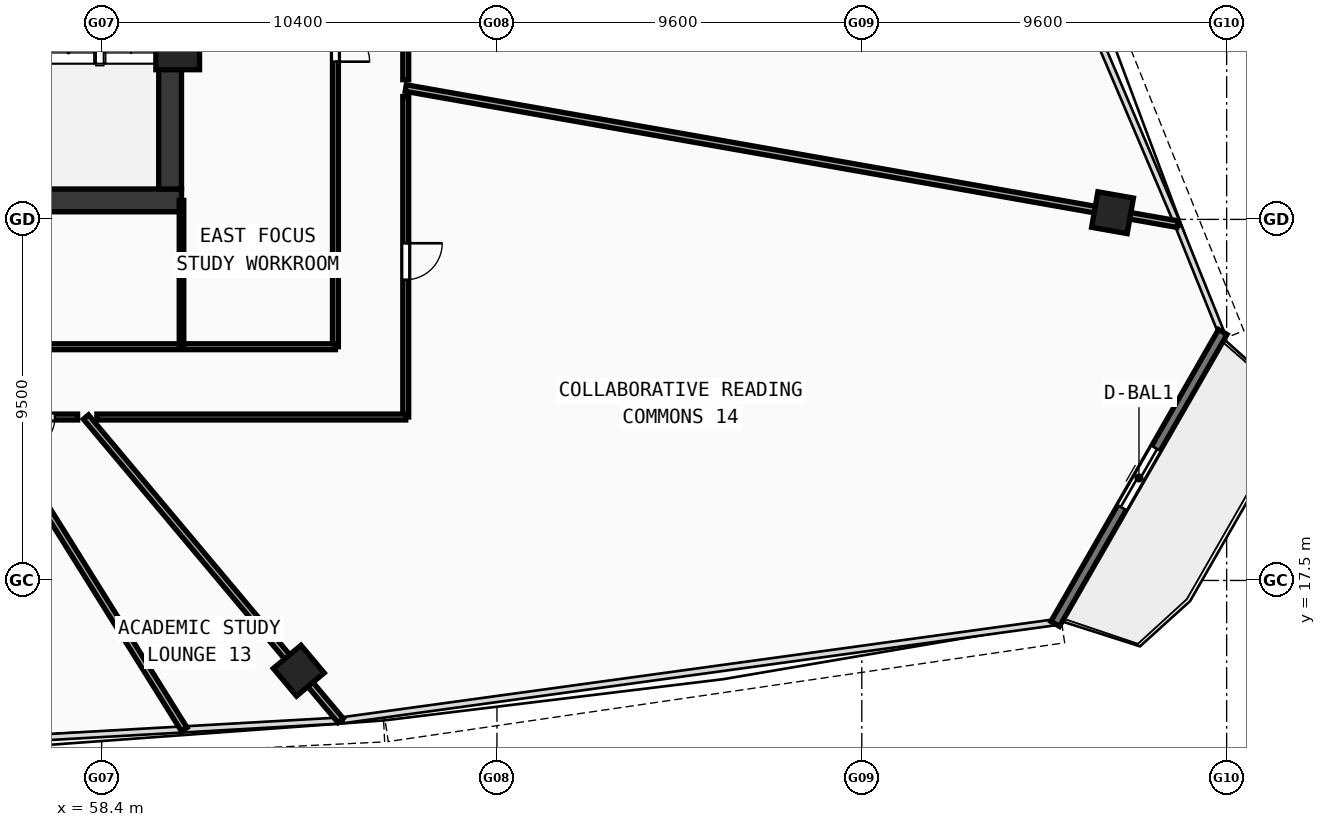
"""IFC4 building model, lengths in metres.
Left out: names, types, materials, properties, quantities, classifications, styles, units other than length and angle.
Written with IfcOpenShell. Run it as: python <this file> out.ifc"""

import sys

from ifc_helpers import new_model, si_unit, direction, frame, frame_2d, origin, origin_with_axes, origin_2d, place, context, subcontext, project, spatial, rectangle, hollow_rectangle, extrude, source, transform, mapped, element, fill, save


model = new_model("IFC4")
c1 = context("Model", 3, precision=1e-05, world=origin(), true_north=direction((0.0, 1.0)))
c2 = subcontext(c1, "Body", "Model", "MODEL_VIEW")
j1 = project(units=[si_unit("LENGTHUNIT", "METRE"), si_unit("PLANEANGLEUNIT", "RADIAN")], contexts=[c1])
p1 = place(None, origin())
s1 = spatial("IfcSite", under=j1, at=p1, CompositionType="ELEMENT")
p2 = place(p1, origin())
s2 = spatial("IfcBuilding", under=s1, at=p2, CompositionType="ELEMENT")
p3 = place(p2, frame((0.0, 0.0, 148.23)))
s3 = spatial("IfcBuildingStorey", under=s2, at=p3, CompositionType="ELEMENT", Elevation=148.23)
p4 = place(p3, frame((35.5, 27.5, 0.0), z_axis=(0.0, 0.0, 1.0), x_axis=(1.0, 0.0, 0.0)))
e1 = element("IfcWall", 1, at=p4, inside=s3, PredefinedType="SHEAR", context=c2, shape_type="SweptSolid", body=[
    extrude(rectangle(XDim=25.0, YDim=0.6, at=frame_2d((12.5, 0.0))), origin(), (0.0, 0.0, 1.0), 3.42),
])
p5 = place(p3, frame((60.2, 27.8, 0.0), z_axis=(0.0, 0.0, 1.0), x_axis=(0.0, 1.0, 0.0)))
e2 = element("IfcWall", 2, at=p5, inside=s3, PredefinedType="SHEAR", context=c2, shape_type="SweptSolid", body=[
    extrude(rectangle(XDim=12.1, YDim=0.6, at=frame_2d((6.05, 0.0))), origin(), (0.0, 0.0, 1.0), 3.42),
])
m1 = source(origin(), c2, "Body", "SweptSolid", [
    extrude(hollow_rectangle(XDim=1.15, YDim=1.15, WallThickness=0.048, at=origin_2d()), origin(), (0.0, 0.0, 1.0), 3.68),
])
p6 = place(p3, frame((60.4, 31.513, -0.26), z_axis=(0.0, 0.0, 1.0), x_axis=(1.0, 0.0, 0.0)))
e3 = element("IfcColumn", 3, at=p6, inside=s3, PredefinedType="COLUMN", context=c2, shape_type="MappedRepresentation", body=[
    mapped(m1, transform((0.0, 0.0, 0.0), scale=1.0)),
])
m2 = source(origin(), c2, "Body", "SweptSolid", [
    extrude(hollow_rectangle(XDim=0.95, YDim=0.95, WallThickness=0.04, at=origin_2d()), origin(), (0.0, 0.0, 1.0), 3.68),
])
for number, where, z_axis, x_axis in (
    (4, (63.585, 15.126, -0.26), (0.0, 0.0, 1.0), (0.766, 0.643, 0.0)),
    (5, (84.997, 27.177, -0.26), (0.0, 0.0, 1.0), (0.174, 0.985, 0.0)),
):
    element("IfcColumn", number, at=place(p3, frame(where, z_axis=z_axis, x_axis=x_axis)), inside=s3, PredefinedType="COLUMN", context=c2, shape_type="MappedRepresentation", body=[
        mapped(m2, transform((0.0, 0.0, 0.0), scale=1.0)),
    ])
p7 = place(p3, frame((83.488, 16.356, 0.0), z_axis=(0.0, 0.0, 1.0), x_axis=(0.497915888941, 0.867225326856, 0.0)))
e6 = element("IfcWall", 6, at=p7, inside=s3, PredefinedType="STANDARD", context=c2, shape_type="SweptSolid", body=[
    extrude(rectangle(XDim=8.858, YDim=0.26, at=frame_2d((4.429, 0.0))), origin(), (0.0, 0.0, 1.0), 3.42),
])
p8 = place(p7, frame((3.529, 0.0, 0.0)))
e7 = element("IfcOpeningElement", 7, at=p8, cuts=e6, PredefinedType="OPENING", context=c2, shape_type="SweptSolid", body=[
    extrude(rectangle(XDim=1.8, YDim=2.15, at=frame_2d((0.9, 1.075))), frame((0.0, 0.14, 0.0), z_axis=(0.0, -1.0, 0.0), x_axis=(1.0, 0.0, 0.0)), (0.0, 0.0, 1.0), 0.28),
])
p9 = place(p3, frame((64.55, 23.65, 0.0), z_axis=(0.0, 0.0, 1.0), x_axis=(0.0, 1.0, 0.0)))
e8 = element("IfcWall", 8, at=p9, inside=s3, PredefinedType="PARTITIONING", context=c2, shape_type="SweptSolid", body=[
    extrude(rectangle(XDim=16.6, YDim=0.155, at=frame_2d((8.3, 0.0))), origin(), (0.0, 0.0, 1.0), 2.77),
])
p10 = place(p9, frame((7.5, 0.0, 0.0)))
e9 = element("IfcOpeningElement", 9, at=p10, cuts=e8, PredefinedType="OPENING", context=c2, shape_type="SweptSolid", body=[
    extrude(rectangle(XDim=0.9, YDim=2.08, at=frame_2d((0.45, 1.04))), frame((0.0, 0.087, 0.0), z_axis=(0.0, -1.0, 0.0), x_axis=(1.0, 0.0, 0.0)), (0.0, 0.0, 1.0), 0.175),
])
p11 = place(p3, frame((31.45, 23.65, 0.0), z_axis=(0.0, 0.0, 1.0), x_axis=(1.0, 0.0, 0.0)))
e10 = element("IfcWall", 10, at=p11, inside=s3, PredefinedType="PARTITIONING", context=c2, shape_type="SweptSolid", body=[
    extrude(rectangle(XDim=33.1, YDim=0.155, at=frame_2d((16.55, 0.0))), origin(), (0.0, 0.0, 1.0), 2.77),
])
p12 = place(p11, frame((16.0, 0.0, 0.0)))
e11 = element("IfcOpeningElement", 11, at=p12, cuts=e10, PredefinedType="OPENING", context=c2, shape_type="SweptSolid", body=[
    extrude(rectangle(XDim=0.92, YDim=2.1, at=frame_2d((0.46, 1.05))), frame((0.0, 0.087, 0.0), z_axis=(0.0, -1.0, 0.0), x_axis=(1.0, 0.0, 0.0)), (0.0, 0.0, 1.0), 0.175),
])
p13 = place(p3, frame((60.5, 23.65, 0.0), z_axis=(0.0, 0.0, 1.0), x_axis=(0.0, 1.0, 0.0)))
e12 = element("IfcWall", 12, at=p13, inside=s3, PredefinedType="PARTITIONING", context=c2, shape_type="SweptSolid", body=[
    extrude(rectangle(XDim=3.85, YDim=0.12, at=frame_2d((1.925, 0.0))), origin(), (0.0, 0.0, 1.0), 3.02),
])
p14 = place(p3, frame((55.436, 21.8, 0.0), z_axis=(0.0, 0.0, 1.0), x_axis=(0.529931002604, -0.848040761096, 0.0)))
e13 = element("IfcWall", 13, at=p14, inside=s3, PredefinedType="PARTITIONING", context=c2, shape_type="SweptSolid", body=[
    extrude(rectangle(XDim=9.691, YDim=0.175, at=frame_2d((4.845, 0.0))), origin(), (0.0, 0.0, 1.0), 2.77),
])
p15 = place(p3, frame((57.985, 21.8, 0.0), z_axis=(0.0, 0.0, 1.0), x_axis=(0.642781677101, -0.76604942111, 0.0)))
e14 = element("IfcWall", 14, at=p15, inside=s3, PredefinedType="PARTITIONING", context=c2, shape_type="SweptSolid", body=[
    extrude(rectangle(XDim=10.424, YDim=0.175, at=frame_2d((5.212, 0.0))), origin(), (0.0, 0.0, 1.0), 2.77),
])
p16 = place(p3, frame((66.4, 30.456, 0.0), z_axis=(0.0, 0.0, 1.0), x_axis=(0.984807623882, -0.173648909998, 0.0)))
e15 = element("IfcWall", 15, at=p16, inside=s3, PredefinedType="PARTITIONING", context=c2, shape_type="SweptSolid", body=[
    extrude(rectangle(XDim=20.622, YDim=0.175, at=frame_2d((10.311, 0.0))), origin(), (0.0, 0.0, 1.0), 2.77),
])
p17 = place(p3, frame((66.4, 39.459, 0.0), z_axis=(0.0, 0.0, 1.0), x_axis=(0.0, -1.0, 0.0)))
e16 = element("IfcWall", 16, at=p17, inside=s3, PredefinedType="PARTITIONING", context=c2, shape_type="SweptSolid", body=[
    extrude(rectangle(XDim=8.783, YDim=0.155, at=frame_2d((4.392, 0.0))), origin(), (0.0, 0.0, 1.0), 3.42),
])
p18 = place(p17, frame((3.932, 0.0, 0.0)))
e17 = element("IfcOpeningElement", 17, at=p18, cuts=e16, PredefinedType="OPENING", context=c2, shape_type="SweptSolid", body=[
    extrude(rectangle(XDim=0.92, YDim=2.1, at=frame_2d((0.46, 1.05))), frame((0.0, 0.087, 0.0), z_axis=(0.0, -1.0, 0.0), x_axis=(1.0, 0.0, 0.0)), (0.0, 0.0, 1.0), 0.175),
])
p19 = place(p3, frame((66.4, 30.232, 0.0), z_axis=(0.0, 0.0, 1.0), x_axis=(0.0, -1.0, 0.0)))
e18 = element("IfcWall", 18, at=p19, inside=s3, PredefinedType="PARTITIONING", context=c2, shape_type="SweptSolid", body=[
    extrude(rectangle(XDim=8.432, YDim=0.155, at=frame_2d((4.216, 0.0))), origin(), (0.0, 0.0, 1.0), 3.02),
])
p20 = place(p19, frame((3.859, 0.0, 0.0)))
e19 = element("IfcOpeningElement", 19, at=p20, cuts=e18, PredefinedType="OPENING", context=c2, shape_type="SweptSolid", body=[
    extrude(rectangle(XDim=0.96, YDim=2.12, at=frame_2d((0.48, 1.06))), frame((0.0, 0.087, 0.0), z_axis=(0.0, -1.0, 0.0), x_axis=(1.0, 0.0, 0.0)), (0.0, 0.0, 1.0), 0.175),
])
p21 = place(p3, frame((66.4, 21.8, 0.0), z_axis=(0.0, 0.0, 1.0), x_axis=(-1.0, 0.0, 0.0)))
e20 = element("IfcWall", 20, at=p21, inside=s3, PredefinedType="PARTITIONING", context=c2, shape_type="SweptSolid", body=[
    extrude(rectangle(XDim=8.127, YDim=0.155, at=frame_2d((4.064, 0.0))), origin(), (0.0, 0.0, 1.0), 3.02),
])
p22 = place(p3, frame((57.765, 21.8, 0.0), z_axis=(0.0, 0.0, 1.0), x_axis=(-1.0, 0.0, 0.0)))
e21 = element("IfcWall", 21, at=p22, inside=s3, PredefinedType="PARTITIONING", context=c2, shape_type="SweptSolid", body=[
    extrude(rectangle(XDim=2.07, YDim=0.155, at=frame_2d((1.035, 0.0))), origin(), (0.0, 0.0, 1.0), 2.77),
])
p23 = place(p22, frame((0.595, 0.0, 0.0)))
e22 = element("IfcOpeningElement", 22, at=p23, cuts=e21, PredefinedType="OPENING", context=c2, shape_type="SweptSolid", body=[
    extrude(rectangle(XDim=0.9, YDim=2.08, at=frame_2d((0.45, 1.04))), frame((0.0, 0.087, 0.0), z_axis=(0.0, -1.0, 0.0), x_axis=(1.0, 0.0, 0.0)), (0.0, 0.0, 1.0), 0.175),
])
m3 = source(origin(), c2, "Body", "SweptSolid", [
    extrude(rectangle(XDim=1.8, YDim=2.15, at=frame_2d((0.9, 1.075))), frame((0.0, 0.025, 0.0), z_axis=(0.0, -1.0, 0.0), x_axis=(1.0, 0.0, 0.0)), (0.0, 0.0, 1.0), 0.05),
])
p24 = place(p8, origin_with_axes())
e23 = element("IfcDoor", 23, at=p24, inside=s3, OperationType="DOUBLE_DOOR_SLIDING", PredefinedType="DOOR", context=c2, shape_type="MappedRepresentation", body=[
    mapped(m3, transform((0.0, 0.0, 0.0), scale=1.0)),
])
fill(e7, e23)
m4 = source(origin(), c2, "Body", "SweptSolid", [
    extrude(rectangle(XDim=0.9, YDim=2.08, at=frame_2d((0.45, 1.04))), frame((0.0, 0.025, 0.0), z_axis=(0.0, -1.0, 0.0), x_axis=(1.0, 0.0, 0.0)), (0.0, 0.0, 1.0), 0.05),
])
p25 = place(p10, frame((0.9, 0.0, 0.0), z_axis=(0.0, 0.0, 1.0), x_axis=(-1.0, 0.0, 0.0)))
e24 = element("IfcDoor", 24, at=p25, inside=s3, OperationType="SINGLE_SWING_RIGHT", PredefinedType="DOOR", context=c2, shape_type="MappedRepresentation", body=[
    mapped(m4, transform((0.0, 0.0, 0.0), scale=1.0)),
])
fill(e9, e24)
p26 = place(p23, origin_with_axes())
e25 = element("IfcDoor", 25, at=p26, inside=s3, OperationType="SINGLE_SWING_RIGHT", PredefinedType="DOOR", context=c2, shape_type="MappedRepresentation", body=[
    mapped(m4, transform((0.0, 0.0, 0.0), scale=1.0)),
])
fill(e22, e25)
m5 = source(origin(), c2, "Body", "SweptSolid", [
    extrude(rectangle(XDim=0.96, YDim=2.12, at=frame_2d((0.48, 1.06))), frame((0.0, 0.025, 0.0), z_axis=(0.0, -1.0, 0.0), x_axis=(1.0, 0.0, 0.0)), (0.0, 0.0, 1.0), 0.05),
])
p27 = place(p20, origin_with_axes())
e26 = element("IfcDoor", 26, at=p27, inside=s3, OperationType="SINGLE_SWING_LEFT", PredefinedType="DOOR", context=c2, shape_type="MappedRepresentation", body=[
    mapped(m5, transform((0.0, 0.0, 0.0), scale=1.0)),
])
fill(e19, e26)
save(model, sys.argv[1])
